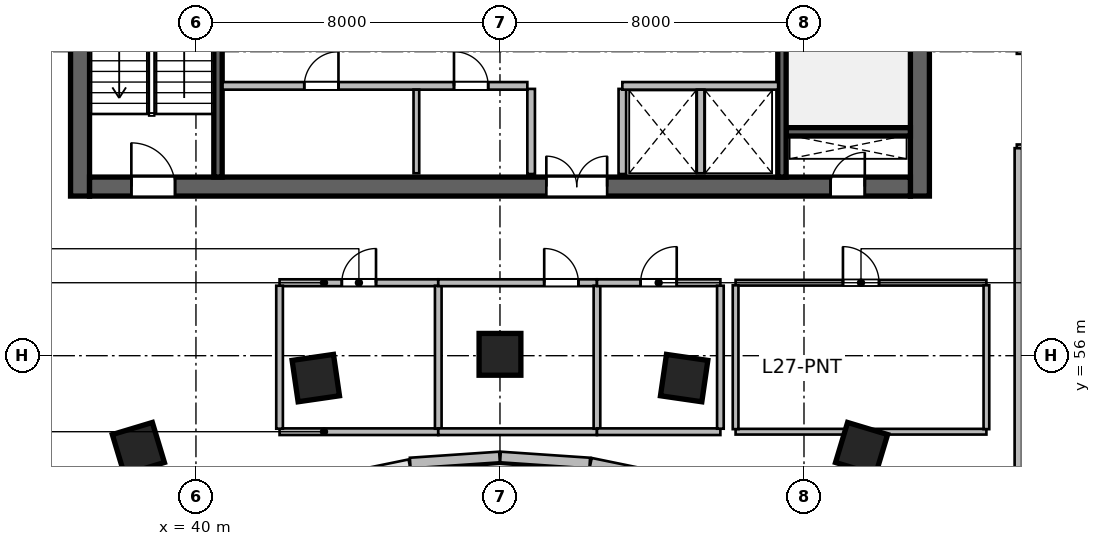
"""IFC4 building model, lengths in metres.
Left out: names, types, materials, properties, quantities, classifications, styles, units other than length and angle.
Written with IfcOpenShell. Run it as: python <this file> out.ifc"""

import sys

from ifc_helpers import new_model, si_unit, direction, frame, frame_2d, origin, origin_2d, place, context, subcontext, project, spatial, rectangle, extrude, source, transform, mapped, element, fill, save


model = new_model("IFC4")
c1 = context("Model", 3, precision=1e-05, world=origin(), true_north=direction((0.0, 1.0)))
c2 = subcontext(c1, "Body", "Model", "MODEL_VIEW")
j1 = project(units=[si_unit("LENGTHUNIT", "METRE"), si_unit("PLANEANGLEUNIT", "RADIAN")], contexts=[c1])
p1 = place(None, origin())
s1 = spatial("IfcSite", under=j1, at=p1, CompositionType="ELEMENT")
p2 = place(p1, origin())
s2 = spatial("IfcBuilding", under=s1, at=p2, CompositionType="ELEMENT")
p3 = place(p2, frame((0.0, 0.0, 115.5)))
s3 = spatial("IfcBuildingStorey", under=s2, at=p3, CompositionType="ELEMENT", Elevation=115.5)
m1 = source(origin(), c2, "Body", "SweptSolid", [
    extrude(rectangle(XDim=12.0, YDim=0.5, at=frame_2d((6.0, 0.0))), origin(), (0.0, 0.0, 1.0), 3.9),
])
for number, where, z_axis, x_axis in (
    (1, (36.95, 60.2, 0.0), (0.0, 0.0, 1.0), (0.0, 1.0, 0.0)),
    (2, (59.05, 60.2, 0.0), (0.0, 0.0, 1.0), (0.0, 1.0, 0.0)),
):
    element("IfcWall", number, at=place(p3, frame(where, z_axis=z_axis, x_axis=x_axis)), inside=s3, PredefinedType="SHEAR", context=c2, shape_type="MappedRepresentation", body=[
        mapped(m1, transform((0.0, 0.0, 0.0), scale=1.0)),
    ])
m2 = source(origin(), c2, "Body", "SweptSolid", [
    extrude(rectangle(XDim=21.6, YDim=0.5, at=frame_2d((10.8, 0.0))), origin(), (0.0, 0.0, 1.0), 3.9),
])
p4 = place(p3, frame((37.2, 60.45, 0.0), z_axis=(0.0, 0.0, 1.0), x_axis=(1.0, 0.0, 0.0)))
e3 = element("IfcWall", 3, at=p4, inside=s3, PredefinedType="SHEAR", context=c2, shape_type="MappedRepresentation", body=[
    mapped(m2, transform((0.0, 0.0, 0.0), scale=1.0)),
])
p5 = place(p4, frame((1.1, 0.0, 0.0)))
e4 = element("IfcOpeningElement", 4, at=p5, cuts=e3, PredefinedType="OPENING", context=c2, shape_type="SweptSolid", body=[
    extrude(rectangle(XDim=1.15, YDim=2.15, at=frame_2d((0.575, 1.075))), frame((0.0, 0.26, 0.0), z_axis=(0.0, -1.0, 0.0), x_axis=(1.0, 0.0, 0.0)), (0.0, 0.0, 1.0), 0.52),
])
p6 = place(p4, frame((19.5, 0.0, 0.0)))
e5 = element("IfcOpeningElement", 5, at=p6, cuts=e3, PredefinedType="OPENING", context=c2, shape_type="SweptSolid", body=[
    extrude(rectangle(XDim=0.9, YDim=2.1, at=frame_2d((0.45, 1.05))), frame((0.0, 0.26, 0.0), z_axis=(0.0, -1.0, 0.0), x_axis=(1.0, 0.0, 0.0)), (0.0, 0.0, 1.0), 0.52),
])
p7 = place(p4, frame((12.02, 0.0, 0.0)))
e6 = element("IfcOpeningElement", 6, at=p7, cuts=e3, PredefinedType="OPENING", context=c2, shape_type="SweptSolid", body=[
    extrude(rectangle(XDim=1.6, YDim=2.15, at=frame_2d((0.8, 1.075))), frame((0.0, 0.26, 0.0), z_axis=(0.0, -1.0, 0.0), x_axis=(1.0, 0.0, 0.0)), (0.0, 0.0, 1.0), 0.52),
])
m3 = source(origin(), c2, "Body", "SweptSolid", [
    extrude(rectangle(XDim=3.27, YDim=0.22, at=frame_2d((1.635, 0.0))), origin(), (0.0, 0.0, 1.0), 3.9),
])
p8 = place(p3, frame((55.53, 61.89, 0.0), z_axis=(0.0, 0.0, 1.0), x_axis=(1.0, 0.0, 0.0)))
e7 = element("IfcWall", 7, at=p8, inside=s3, PredefinedType="SHEAR", context=c2, shape_type="MappedRepresentation", body=[
    mapped(m3, transform((0.0, 0.0, 0.0), scale=1.0)),
])
m4 = source(origin(), c2, "Body", "SweptSolid", [
    extrude(rectangle(XDim=11.0, YDim=0.22, at=frame_2d((5.5, 0.0))), origin(), (0.0, 0.0, 1.0), 3.9),
])
p9 = place(p3, frame((40.58, 60.7, 0.0), z_axis=(0.0, 0.0, 1.0), x_axis=(0.0, 1.0, 0.0)))
e8 = element("IfcWall", 8, at=p9, inside=s3, PredefinedType="SHEAR", context=c2, shape_type="MappedRepresentation", body=[
    mapped(m4, transform((0.0, 0.0, 0.0), scale=1.0)),
])
p10 = place(p3, frame((55.42, 60.7, 0.0), z_axis=(0.0, 0.0, 1.0), x_axis=(0.0, 1.0, 0.0)))
e9 = element("IfcWall", 9, at=p10, inside=s3, PredefinedType="SHEAR", context=c2, shape_type="MappedRepresentation", body=[
    mapped(m4, transform((0.0, 0.0, 0.0), scale=1.0)),
])
p11 = place(p10, frame((9.545, 0.0, 0.0)))
e10 = element("IfcOpeningElement", 10, at=p11, cuts=e9, PredefinedType="OPENING", context=c2, shape_type="SweptSolid", body=[
    extrude(rectangle(XDim=1.15, YDim=2.15, at=frame_2d((0.575, 1.075))), frame((0.0, 0.12, 0.0), z_axis=(0.0, -1.0, 0.0), x_axis=(1.0, 0.0, 0.0)), (0.0, 0.0, 1.0), 0.24),
])
m5 = source(origin(), c2, "Body", "SweptSolid", [
    extrude(rectangle(XDim=1.1, YDim=1.1, at=origin_2d()), origin(), (0.0, 0.0, 1.0), 3.9),
])
for number, where, z_axis, x_axis in (
    (11, (38.485, 53.558, 0.0), (0.0, 0.0, 1.0), (-0.289, 0.957, 0.0)),
    (12, (43.154, 55.411, 0.0), (0.0, 0.0, 1.0), (-0.143, 0.99, 0.0)),
    (13, (48.0, 56.036, 0.0), (0.0, 0.0, 1.0), (0.0, 1.0, 0.0)),
    (14, (52.846, 55.411, 0.0), (0.0, 0.0, 1.0), (0.143, 0.99, 0.0)),
    (15, (57.515, 53.558, 0.0), (0.0, 0.0, 1.0), (0.289, 0.957, 0.0)),
):
    element("IfcColumn", number, at=place(p3, frame(where, z_axis=z_axis, x_axis=x_axis)), inside=s3, PredefinedType="COLUMN", context=c2, shape_type="MappedRepresentation", body=[
        mapped(m5, transform((0.0, 0.0, 0.0), scale=1.0)),
    ])
m6 = source(origin(), c2, "Body", "SweptSolid", [
    extrude(rectangle(XDim=2.374, YDim=0.28, at=frame_2d((1.187, 0.0))), origin(), (0.0, 0.0, 1.0), 3.65),
])
p12 = place(p3, frame((52.711, 52.695, 0.0), z_axis=(0.0, 0.0, 1.0), x_axis=(-0.979619827472, 0.200860632341, 0.0)))
e16 = element("IfcWall", 16, at=p12, inside=s3, PredefinedType="SOLIDWALL", context=c2, shape_type="MappedRepresentation", body=[
    mapped(m6, transform((0.0, 0.0, 0.0), scale=1.0)),
])
m7 = source(origin(), c2, "Body", "SweptSolid", [
    extrude(rectangle(XDim=2.355, YDim=0.28, at=frame_2d((1.177, 0.0))), origin(), (0.0, 0.0, 1.0), 3.65),
])
for number, where, z_axis, x_axis in (
    (17, (50.362, 53.175, 0.0), (0.0, 0.0, 1.0), (-0.998, 0.068, 0.0)),
    (18, (47.988, 53.335, 0.0), (0.0, 0.0, 1.0), (-0.998, -0.068, 0.0)),
):
    element("IfcWall", number, at=place(p3, frame(where, z_axis=z_axis, x_axis=x_axis)), inside=s3, PredefinedType="SOLIDWALL", context=c2, shape_type="MappedRepresentation", body=[
        mapped(m7, transform((0.0, 0.0, 0.0), scale=1.0)),
    ])
m8 = source(origin(), c2, "Body", "SweptSolid", [
    extrude(rectangle(XDim=2.24, YDim=0.2, at=frame_2d((1.12, 0.0))), origin(), (0.0, 0.0, 1.0), 3.65),
])
for number, where, z_axis, x_axis in (
    (19, (48.82, 60.78, 0.0), (0.0, 0.0, 1.0), (0.0, 1.0, 0.0)),
    (20, (51.22, 60.78, 0.0), (0.0, 0.0, 1.0), (0.0, 1.0, 0.0)),
):
    element("IfcWall", number, at=place(p3, frame(where, z_axis=z_axis, x_axis=x_axis)), inside=s3, PredefinedType="SOLIDWALL", context=c2, shape_type="MappedRepresentation", body=[
        mapped(m8, transform((0.0, 0.0, 0.0), scale=1.0)),
    ])
m9 = source(origin(), c2, "Body", "SweptSolid", [
    extrude(rectangle(XDim=8.02, YDim=0.2, at=frame_2d((4.01, 0.0))), origin(), (0.0, 0.0, 1.0), 3.65),
])
p13 = place(p3, frame((40.7, 63.1, 0.0), z_axis=(0.0, 0.0, 1.0), x_axis=(1.0, 0.0, 0.0)))
e21 = element("IfcWall", 21, at=p13, inside=s3, PredefinedType="SOLIDWALL", context=c2, shape_type="MappedRepresentation", body=[
    mapped(m9, transform((0.0, 0.0, 0.0), scale=1.0)),
])
p14 = place(p13, frame((2.15, 0.0, 0.0)))
e22 = element("IfcOpeningElement", 22, at=p14, cuts=e21, PredefinedType="OPENING", context=c2, shape_type="SweptSolid", body=[
    extrude(rectangle(XDim=0.9, YDim=2.1, at=frame_2d((0.45, 1.05))), frame((0.0, 0.11, 0.0), z_axis=(0.0, -1.0, 0.0), x_axis=(1.0, 0.0, 0.0)), (0.0, 0.0, 1.0), 0.22),
])
p15 = place(p13, frame((6.09, 0.0, 0.0)))
e23 = element("IfcOpeningElement", 23, at=p15, cuts=e21, PredefinedType="OPENING", context=c2, shape_type="SweptSolid", body=[
    extrude(rectangle(XDim=0.9, YDim=2.1, at=frame_2d((0.45, 1.05))), frame((0.0, 0.11, 0.0), z_axis=(0.0, -1.0, 0.0), x_axis=(1.0, 0.0, 0.0)), (0.0, 0.0, 1.0), 0.22),
])
m10 = source(origin(), c2, "Body", "SweptSolid", [
    extrude(rectangle(XDim=4.1, YDim=0.2, at=frame_2d((2.05, 0.0))), origin(), (0.0, 0.0, 1.0), 3.65),
])
p16 = place(p3, frame((51.22, 63.1, 0.0), z_axis=(0.0, 0.0, 1.0), x_axis=(1.0, 0.0, 0.0)))
e24 = element("IfcWall", 24, at=p16, inside=s3, PredefinedType="SOLIDWALL", context=c2, shape_type="MappedRepresentation", body=[
    mapped(m10, transform((0.0, 0.0, 0.0), scale=1.0)),
])
m11 = source(origin(), c2, "Body", "SweptSolid", [
    extrude(rectangle(XDim=2.2, YDim=0.15, at=frame_2d((1.1, 0.0))), origin(), (0.0, 0.0, 1.0), 3.65),
])
p17 = place(p3, frame((45.8, 60.8, 0.0), z_axis=(0.0, 0.0, 1.0), x_axis=(0.0, 1.0, 0.0)))
e25 = element("IfcWall", 25, at=p17, inside=s3, PredefinedType="PARTITIONING", context=c2, shape_type="MappedRepresentation", body=[
    mapped(m11, transform((0.0, 0.0, 0.0), scale=1.0)),
])
m12 = source(origin(), c2, "Body", "SweptSolid", [
    extrude(rectangle(XDim=2.2, YDim=0.2, at=frame_2d((1.1, 0.0))), origin(), (0.0, 0.0, 1.0), 3.65),
])
p18 = place(p3, frame((53.28, 60.8, 0.0), z_axis=(0.0, 0.0, 1.0), x_axis=(0.0, 1.0, 0.0)))
e26 = element("IfcWall", 26, at=p18, inside=s3, PredefinedType="SOLIDWALL", context=c2, shape_type="MappedRepresentation", body=[
    mapped(m12, transform((0.0, 0.0, 0.0), scale=1.0)),
])
m13 = source(origin(), c2, "Body", "SweptSolid", [
    extrude(rectangle(XDim=4.176, YDim=0.175, at=frame_2d((2.088, 0.0))), origin(), (0.0, 0.0, 1.0), 3.65),
])
p19 = place(p3, frame((42.2, 54.0, 0.0), z_axis=(0.0, 0.0, 1.0), x_axis=(1.0, 0.0, 0.0)))
e27 = element("IfcWall", 27, at=p19, inside=s3, PredefinedType="PARTITIONING", context=c2, shape_type="MappedRepresentation", body=[
    mapped(m13, transform((0.0, 0.0, 0.0), scale=1.0)),
])
m14 = source(origin(), c2, "Body", "SweptSolid", [
    extrude(rectangle(XDim=4.176, YDim=0.18, at=frame_2d((2.088, 0.0))), origin(), (0.0, 0.0, 1.0), 3.65),
])
p20 = place(p3, frame((42.2, 57.92, 0.0), z_axis=(0.0, 0.0, 1.0), x_axis=(1.0, 0.0, 0.0)))
e28 = element("IfcWall", 28, at=p20, inside=s3, PredefinedType="PLUMBINGWALL", context=c2, shape_type="MappedRepresentation", body=[
    mapped(m14, transform((0.0, 0.0, 0.0), scale=1.0)),
])
p21 = place(p20, frame((1.638, 0.0, 0.0)))
e29 = element("IfcOpeningElement", 29, at=p21, cuts=e28, PredefinedType="OPENING", context=c2, shape_type="SweptSolid", body=[
    extrude(rectangle(XDim=0.9, YDim=2.08, at=frame_2d((0.45, 1.04))), frame((0.0, 0.1, 0.0), z_axis=(0.0, -1.0, 0.0), x_axis=(1.0, 0.0, 0.0)), (0.0, 0.0, 1.0), 0.2),
])
m15 = source(origin(), c2, "Body", "SweptSolid", [
    extrude(rectangle(XDim=3.763, YDim=0.175, at=frame_2d((1.881, 0.0))), origin(), (0.0, 0.0, 1.0), 3.65),
])
for number, where, z_axis, x_axis in (
    (30, (42.2, 54.079, 0.0), (0.0, 0.0, 1.0), (0.0, 1.0, 0.0)),
    (31, (46.376, 54.079, 0.0), (0.0, 0.0, 1.0), (0.0, 1.0, 0.0)),
):
    element("IfcWall", number, at=place(p3, frame(where, z_axis=z_axis, x_axis=x_axis)), inside=s3, PredefinedType="PARTITIONING", context=c2, shape_type="MappedRepresentation", body=[
        mapped(m15, transform((0.0, 0.0, 0.0), scale=1.0)),
    ])
p22 = place(p3, frame((46.376, 54.0, 0.0), z_axis=(0.0, 0.0, 1.0), x_axis=(1.0, 0.0, 0.0)))
e32 = element("IfcWall", 32, at=p22, inside=s3, PredefinedType="PARTITIONING", context=c2, shape_type="MappedRepresentation", body=[
    mapped(m13, transform((0.0, 0.0, 0.0), scale=1.0)),
])
p23 = place(p3, frame((46.376, 57.92, 0.0), z_axis=(0.0, 0.0, 1.0), x_axis=(1.0, 0.0, 0.0)))
e33 = element("IfcWall", 33, at=p23, inside=s3, PredefinedType="PLUMBINGWALL", context=c2, shape_type="MappedRepresentation", body=[
    mapped(m14, transform((0.0, 0.0, 0.0), scale=1.0)),
])
p24 = place(p23, frame((2.788, 0.0, 0.0)))
e34 = element("IfcOpeningElement", 34, at=p24, cuts=e33, PredefinedType="OPENING", context=c2, shape_type="SweptSolid", body=[
    extrude(rectangle(XDim=0.9, YDim=2.08, at=frame_2d((0.45, 1.04))), frame((0.0, 0.1, 0.0), z_axis=(0.0, -1.0, 0.0), x_axis=(1.0, 0.0, 0.0)), (0.0, 0.0, 1.0), 0.2),
])
p25 = place(p3, frame((50.552, 54.079, 0.0), z_axis=(0.0, 0.0, 1.0), x_axis=(0.0, 1.0, 0.0)))
e35 = element("IfcWall", 35, at=p25, inside=s3, PredefinedType="PARTITIONING", context=c2, shape_type="MappedRepresentation", body=[
    mapped(m15, transform((0.0, 0.0, 0.0), scale=1.0)),
])
m16 = source(origin(), c2, "Body", "SweptSolid", [
    extrude(rectangle(XDim=3.248, YDim=0.175, at=frame_2d((1.624, 0.0))), origin(), (0.0, 0.0, 1.0), 3.65),
])
p26 = place(p3, frame((50.552, 54.0, 0.0), z_axis=(0.0, 0.0, 1.0), x_axis=(1.0, 0.0, 0.0)))
e36 = element("IfcWall", 36, at=p26, inside=s3, PredefinedType="PARTITIONING", context=c2, shape_type="MappedRepresentation", body=[
    mapped(m16, transform((0.0, 0.0, 0.0), scale=1.0)),
])
m17 = source(origin(), c2, "Body", "SweptSolid", [
    extrude(rectangle(XDim=3.248, YDim=0.18, at=frame_2d((1.624, 0.0))), origin(), (0.0, 0.0, 1.0), 3.65),
])
p27 = place(p3, frame((50.552, 57.92, 0.0), z_axis=(0.0, 0.0, 1.0), x_axis=(1.0, 0.0, 0.0)))
e37 = element("IfcWall", 37, at=p27, inside=s3, PredefinedType="PLUMBINGWALL", context=c2, shape_type="MappedRepresentation", body=[
    mapped(m17, transform((0.0, 0.0, 0.0), scale=1.0)),
])
p28 = place(p27, frame((1.149, 0.0, 0.0)))
e38 = element("IfcOpeningElement", 38, at=p28, cuts=e37, PredefinedType="OPENING", context=c2, shape_type="SweptSolid", body=[
    extrude(rectangle(XDim=0.95, YDim=2.12, at=frame_2d((0.475, 1.06))), frame((0.0, 0.1, 0.0), z_axis=(0.0, -1.0, 0.0), x_axis=(1.0, 0.0, 0.0)), (0.0, 0.0, 1.0), 0.2),
])
p29 = place(p3, frame((53.8, 54.079, 0.0), z_axis=(0.0, 0.0, 1.0), x_axis=(0.0, 1.0, 0.0)))
e39 = element("IfcWall", 39, at=p29, inside=s3, PredefinedType="PARTITIONING", context=c2, shape_type="MappedRepresentation", body=[
    mapped(m15, transform((0.0, 0.0, 0.0), scale=1.0)),
])
m18 = source(origin(), c2, "Body", "SweptSolid", [
    extrude(rectangle(XDim=6.6, YDim=0.15, at=frame_2d((3.3, 0.0))), origin(), (0.0, 0.0, 1.0), 3.095),
])
p30 = place(p3, frame((54.2, 54.0, 0.0), z_axis=(0.0, 0.0, 1.0), x_axis=(1.0, 0.0, 0.0)))
e40 = element("IfcWall", 40, at=p30, inside=s3, PredefinedType="PARTITIONING", context=c2, shape_type="MappedRepresentation", body=[
    mapped(m18, transform((0.0, 0.0, 0.0), scale=1.0)),
])
m19 = source(origin(), c2, "Body", "SweptSolid", [
    extrude(rectangle(XDim=6.6, YDim=0.15, at=frame_2d((3.3, 0.0))), origin(), (0.0, 0.0, 1.0), 3.65),
])
p31 = place(p3, frame((54.2, 57.92, 0.0), z_axis=(0.0, 0.0, 1.0), x_axis=(1.0, 0.0, 0.0)))
e41 = element("IfcWall", 41, at=p31, inside=s3, PredefinedType="PARTITIONING", context=c2, shape_type="MappedRepresentation", body=[
    mapped(m19, transform((0.0, 0.0, 0.0), scale=1.0)),
])
p32 = place(p31, frame((2.825, 0.0, 0.0)))
e42 = element("IfcOpeningElement", 42, at=p32, cuts=e41, PredefinedType="OPENING", context=c2, shape_type="SweptSolid", body=[
    extrude(rectangle(XDim=0.95, YDim=2.1, at=frame_2d((0.475, 1.05))), frame((0.0, 0.085, 0.0), z_axis=(0.0, -1.0, 0.0), x_axis=(1.0, 0.0, 0.0)), (0.0, 0.0, 1.0), 0.17),
])
m20 = source(origin(), c2, "Body", "SweptSolid", [
    extrude(rectangle(XDim=3.785, YDim=0.15, at=frame_2d((1.893, 0.0))), origin(), (0.0, 0.0, 1.0), 3.65),
])
for number, where, z_axis, x_axis in (
    (43, (54.2, 54.067, 0.0), (0.0, 0.0, 1.0), (0.0, 1.0, 0.0)),
    (44, (60.8, 54.067, 0.0), (0.0, 0.0, 1.0), (0.0, 1.0, 0.0)),
):
    element("IfcWall", number, at=place(p3, frame(where, z_axis=z_axis, x_axis=x_axis)), inside=s3, PredefinedType="PARTITIONING", context=c2, shape_type="MappedRepresentation", body=[
        mapped(m20, transform((0.0, 0.0, 0.0), scale=1.0)),
    ])
m21 = source(origin(), c2, "Body", "SweptSolid", [
    extrude(rectangle(XDim=6.9, YDim=0.195, at=frame_2d((3.45, 0.0))), origin(), (0.0, 0.0, 1.0), 3.65),
])
p33 = place(p3, frame((61.6, 64.04, 0.0), z_axis=(0.0, 0.0, 1.0), x_axis=(1.0, 0.0, 0.0)))
e45 = element("IfcWall", 45, at=p33, inside=s3, PredefinedType="PARTITIONING", context=c2, shape_type="MappedRepresentation", body=[
    mapped(m21, transform((0.0, 0.0, 0.0), scale=1.0)),
])
p34 = place(p33, frame((2.975, 0.0, 0.0)))
e46 = element("IfcOpeningElement", 46, at=p34, cuts=e45, PredefinedType="OPENING", context=c2, shape_type="SweptSolid", body=[
    extrude(rectangle(XDim=0.95, YDim=2.1, at=frame_2d((0.475, 1.05))), frame((0.0, 0.107, 0.0), z_axis=(0.0, -1.0, 0.0), x_axis=(1.0, 0.0, 0.0)), (0.0, 0.0, 1.0), 0.215),
])
p35 = place(p3, frame((61.6, 61.46, 0.0), z_axis=(0.0, 0.0, 1.0), x_axis=(1.0, 0.0, 0.0)))
e47 = element("IfcWall", 47, at=p35, inside=s3, PredefinedType="PARTITIONING", context=c2, shape_type="MappedRepresentation", body=[
    mapped(m21, transform((0.0, 0.0, 0.0), scale=1.0)),
])
p36 = place(p35, frame((2.975, 0.0, 0.0)))
e48 = element("IfcOpeningElement", 48, at=p36, cuts=e47, PredefinedType="OPENING", context=c2, shape_type="SweptSolid", body=[
    extrude(rectangle(XDim=0.95, YDim=2.1, at=frame_2d((0.475, 1.05))), frame((0.0, 0.107, 0.0), z_axis=(0.0, -1.0, 0.0), x_axis=(1.0, 0.0, 0.0)), (0.0, 0.0, 1.0), 0.215),
])
m22 = source(origin(), c2, "Body", "SweptSolid", [
    extrude(rectangle(XDim=13.988, YDim=0.195, at=frame_2d((6.994, 0.0))), origin(), (0.0, 0.0, 1.0), 2.942),
])
p37 = place(p3, frame((61.64, 47.472, 0.0), z_axis=(0.0, 0.0, 1.0), x_axis=(0.0, 1.0, 0.0)))
e49 = element("IfcWall", 49, at=p37, inside=s3, PredefinedType="PARTITIONING", context=c2, shape_type="MappedRepresentation", body=[
    mapped(m22, transform((0.0, 0.0, 0.0), scale=1.0)),
])
m23 = source(origin(), c2, "Body", "SweptSolid", [
    extrude(rectangle(XDim=1.15, YDim=2.15, at=frame_2d((0.575, 1.075))), frame((0.0, 0.025, 0.0), z_axis=(0.0, -1.0, 0.0), x_axis=(1.0, 0.0, 0.0)), (0.0, 0.0, 1.0), 0.05),
])
p38 = place(p5, origin())
e50 = element("IfcDoor", 50, at=p38, inside=s3, OperationType="SINGLE_SWING_LEFT", PredefinedType="DOOR", context=c2, shape_type="MappedRepresentation", body=[
    mapped(m23, transform((0.0, 0.0, 0.0), scale=1.0)),
])
fill(e4, e50)
m24 = source(origin(), c2, "Body", "SweptSolid", [
    extrude(rectangle(XDim=0.9, YDim=2.1, at=frame_2d((0.45, 1.05))), frame((0.0, 0.025, 0.0), z_axis=(0.0, -1.0, 0.0), x_axis=(1.0, 0.0, 0.0)), (0.0, 0.0, 1.0), 0.05),
])
p39 = place(p6, origin())
e51 = element("IfcDoor", 51, at=p39, inside=s3, OperationType="SINGLE_SWING_RIGHT", PredefinedType="DOOR", context=c2, shape_type="MappedRepresentation", body=[
    mapped(m24, transform((0.0, 0.0, 0.0), scale=1.0)),
])
fill(e5, e51)
m25 = source(origin(), c2, "Body", "SweptSolid", [
    extrude(rectangle(XDim=1.6, YDim=2.15, at=frame_2d((0.8, 1.075))), frame((0.0, 0.025, 0.0), z_axis=(0.0, -1.0, 0.0), x_axis=(1.0, 0.0, 0.0)), (0.0, 0.0, 1.0), 0.05),
])
p40 = place(p7, origin())
e52 = element("IfcDoor", 52, at=p40, inside=s3, OperationType="DOUBLE_DOOR_SINGLE_SWING", PredefinedType="DOOR", context=c2, shape_type="MappedRepresentation", body=[
    mapped(m25, transform((0.0, 0.0, 0.0), scale=1.0)),
])
fill(e6, e52)
p41 = place(p14, origin())
e53 = element("IfcDoor", 53, at=p41, inside=s3, OperationType="SINGLE_SWING_RIGHT", PredefinedType="DOOR", context=c2, shape_type="MappedRepresentation", body=[
    mapped(m24, transform((0.0, 0.0, 0.0), scale=1.0)),
])
fill(e22, e53)
p42 = place(p15, origin())
e54 = element("IfcDoor", 54, at=p42, inside=s3, OperationType="SINGLE_SWING_LEFT", PredefinedType="DOOR", context=c2, shape_type="MappedRepresentation", body=[
    mapped(m24, transform((0.0, 0.0, 0.0), scale=1.0)),
])
fill(e23, e54)
m26 = source(origin(), c2, "Body", "SweptSolid", [
    extrude(rectangle(XDim=0.9, YDim=2.08, at=frame_2d((0.45, 1.04))), frame((0.0, 0.025, 0.0), z_axis=(0.0, -1.0, 0.0), x_axis=(1.0, 0.0, 0.0)), (0.0, 0.0, 1.0), 0.05),
])
p43 = place(p21, origin())
e55 = element("IfcDoor", 55, at=p43, inside=s3, OperationType="SINGLE_SWING_RIGHT", PredefinedType="DOOR", context=c2, shape_type="MappedRepresentation", body=[
    mapped(m26, transform((0.0, 0.0, 0.0), scale=1.0)),
])
fill(e29, e55)
p44 = place(p24, origin())
e56 = element("IfcDoor", 56, at=p44, inside=s3, OperationType="SINGLE_SWING_LEFT", PredefinedType="DOOR", context=c2, shape_type="MappedRepresentation", body=[
    mapped(m26, transform((0.0, 0.0, 0.0), scale=1.0)),
])
fill(e34, e56)
m27 = source(origin(), c2, "Body", "SweptSolid", [
    extrude(rectangle(XDim=0.95, YDim=2.12, at=frame_2d((0.475, 1.06))), frame((0.0, 0.025, 0.0), z_axis=(0.0, -1.0, 0.0), x_axis=(1.0, 0.0, 0.0)), (0.0, 0.0, 1.0), 0.05),
])
p45 = place(p28, origin())
e57 = element("IfcDoor", 57, at=p45, inside=s3, OperationType="SINGLE_SWING_RIGHT", PredefinedType="DOOR", context=c2, shape_type="MappedRepresentation", body=[
    mapped(m27, transform((0.0, 0.0, 0.0), scale=1.0)),
])
fill(e38, e57)
m28 = source(origin(), c2, "Body", "SweptSolid", [
    extrude(rectangle(XDim=0.95, YDim=2.1, at=frame_2d((0.475, 1.05))), frame((0.0, 0.025, 0.0), z_axis=(0.0, -1.0, 0.0), x_axis=(1.0, 0.0, 0.0)), (0.0, 0.0, 1.0), 0.05),
])
p46 = place(p32, origin())
e58 = element("IfcDoor", 58, at=p46, inside=s3, OperationType="SINGLE_SWING_LEFT", PredefinedType="DOOR", context=c2, shape_type="MappedRepresentation", body=[
    mapped(m28, transform((0.0, 0.0, 0.0), scale=1.0)),
])
fill(e42, e58)
save(model, sys.argv[1])
